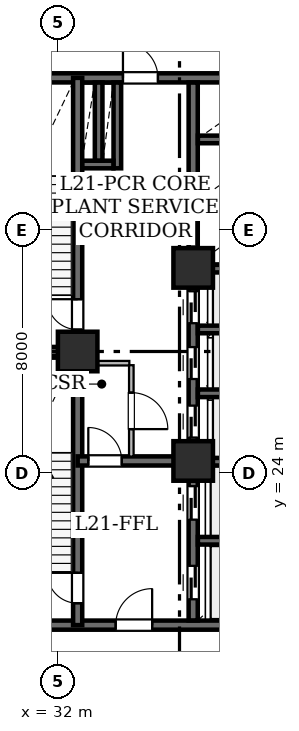
"""IFC4 building model, lengths in metres.
Left out: names, types, materials, properties, quantities, classifications, styles, units other than length and angle.
Written with IfcOpenShell. Run it as: python <this file> out.ifc"""

import sys

from ifc_helpers import new_model, si_unit, direction, frame, frame_2d, origin, origin_2d, place, context, subcontext, project, spatial, rectangle, hollow_rectangle, extrude, element, fill, save


model = new_model("IFC4")
c1 = context("Model", 3, precision=1e-05, world=origin(), true_north=direction((0.0, 1.0)))
c2 = subcontext(c1, "Body", "Model", "MODEL_VIEW")
j1 = project(units=[si_unit("LENGTHUNIT", "METRE"), si_unit("PLANEANGLEUNIT", "RADIAN")], contexts=[c1])
p1 = place(None, origin())
s1 = spatial("IfcSite", under=j1, at=p1, CompositionType="ELEMENT")
p2 = place(p1, origin())
s2 = spatial("IfcBuilding", under=s1, at=p2, CompositionType="ELEMENT")
p3 = place(p2, frame((0.0, 0.0, 84.4)))
s3 = spatial("IfcBuildingStorey", under=s2, at=p3, CompositionType="ELEMENT", Elevation=84.4)
for number, where, z_axis, x_axis in (
    (1, (32.65, 28.0, 0.0), (0.0, 0.0, 1.0), (1.0, 0.0, 0.0)),
    (2, (36.45, 24.4, 0.0), (0.0, 0.0, 1.0), (1.0, 0.0, 0.0)),
    (3, (36.45, 30.75, 0.0), (0.0, 0.0, 1.0), (1.0, 0.0, 0.0)),
):
    element("IfcColumn", number, at=place(p3, frame(where, z_axis=z_axis, x_axis=x_axis)), inside=s3, PredefinedType="COLUMN", context=c2, shape_type="SweptSolid", body=[
        extrude(hollow_rectangle(XDim=1.3, YDim=1.3, WallThickness=0.065, at=origin_2d()), origin(), (0.0, 0.0, 1.0), 5.375),
    ])
p4 = place(p3, frame((29.0, 19.0, 0.0), z_axis=(0.0, 0.0, 1.0), x_axis=(1.0, 0.0, 0.0)))
e4 = element("IfcWall", 4, at=p4, inside=s3, PredefinedType="SHEAR", context=c2, shape_type="SweptSolid", body=[
    extrude(rectangle(XDim=10.4, YDim=0.3, at=frame_2d((5.2, 0.0))), origin(), (0.0, 0.0, 1.0), 4.98),
])
p5 = place(p4, frame((4.9, 0.0, 0.0)))
e5 = element("IfcOpeningElement", 5, at=p5, cuts=e4, PredefinedType="OPENING", context=c2, shape_type="SweptSolid", body=[
    extrude(rectangle(XDim=1.2, YDim=2.15, at=frame_2d((0.6, 1.075))), frame((0.0, 0.16, 0.0), z_axis=(0.0, -1.0, 0.0), x_axis=(1.0, 0.0, 0.0)), (0.0, 0.0, 1.0), 0.32),
])
p6 = place(p3, frame((29.0, 37.0, 0.0), z_axis=(0.0, 0.0, 1.0), x_axis=(1.0, 0.0, 0.0)))
e6 = element("IfcWall", 6, at=p6, inside=s3, PredefinedType="SHEAR", context=c2, shape_type="SweptSolid", body=[
    extrude(rectangle(XDim=10.4, YDim=0.3, at=frame_2d((5.2, 0.0))), origin(), (0.0, 0.0, 1.0), 4.98),
])
p7 = place(p6, frame((5.14, 0.0, 0.0)))
e7 = element("IfcOpeningElement", 7, at=p7, cuts=e6, PredefinedType="OPENING", context=c2, shape_type="SweptSolid", body=[
    extrude(rectangle(XDim=1.15, YDim=2.2, at=frame_2d((0.575, 1.1))), frame((0.0, 0.16, 0.0), z_axis=(0.0, -1.0, 0.0), x_axis=(1.0, 0.0, 0.0)), (0.0, 0.0, 1.0), 0.32),
])
p8 = place(p3, frame((32.65, 19.0, 0.0), z_axis=(0.0, 0.0, 1.0), x_axis=(0.0, 1.0, 0.0)))
e8 = element("IfcWall", 8, at=p8, inside=s3, PredefinedType="SHEAR", context=c2, shape_type="SweptSolid", body=[
    extrude(rectangle(XDim=9.0, YDim=0.3, at=frame_2d((4.5, 0.0))), origin(), (0.0, 0.0, 1.0), 4.98),
])
p9 = place(p8, frame((0.72, 0.0, 0.0)))
e9 = element("IfcOpeningElement", 9, at=p9, cuts=e8, PredefinedType="OPENING", context=c2, shape_type="SweptSolid", body=[
    extrude(rectangle(XDim=1.0, YDim=2.15, at=frame_2d((0.5, 1.075))), frame((0.0, 0.16, 0.0), z_axis=(0.0, -1.0, 0.0), x_axis=(1.0, 0.0, 0.0)), (0.0, 0.0, 1.0), 0.32),
])
p10 = place(p3, frame((32.65, 28.0, 0.0), z_axis=(0.0, 0.0, 1.0), x_axis=(0.0, 1.0, 0.0)))
e10 = element("IfcWall", 10, at=p10, inside=s3, PredefinedType="SHEAR", context=c2, shape_type="SweptSolid", body=[
    extrude(rectangle(XDim=9.0, YDim=0.3, at=frame_2d((4.5, 0.0))), origin(), (0.0, 0.0, 1.0), 4.98),
])
p11 = place(p10, frame((0.72, 0.0, 0.0)))
e11 = element("IfcOpeningElement", 11, at=p11, cuts=e10, PredefinedType="OPENING", context=c2, shape_type="SweptSolid", body=[
    extrude(rectangle(XDim=1.0, YDim=2.15, at=frame_2d((0.5, 1.075))), frame((0.0, 0.16, 0.0), z_axis=(0.0, -1.0, 0.0), x_axis=(1.0, 0.0, 0.0)), (0.0, 0.0, 1.0), 0.32),
])
p12 = place(p3, frame((29.0, 28.0, 0.0), z_axis=(0.0, 0.0, 1.0), x_axis=(1.0, 0.0, 0.0)))
e12 = element("IfcWall", 12, at=p12, inside=s3, PredefinedType="SHEAR", context=c2, shape_type="SweptSolid", body=[
    extrude(rectangle(XDim=3.65, YDim=0.3, at=frame_2d((1.825, 0.0))), origin(), (0.0, 0.0, 1.0), 4.98),
])
p13 = place(p3, frame((32.65, 24.4, 0.0), z_axis=(0.0, 0.0, 1.0), x_axis=(1.0, 0.0, 0.0)))
e13 = element("IfcWall", 13, at=p13, inside=s3, PredefinedType="SHEAR", context=c2, shape_type="SweptSolid", body=[
    extrude(rectangle(XDim=3.8, YDim=0.3, at=frame_2d((1.9, 0.0))), origin(), (0.0, 0.0, 1.0), 4.98),
])
p14 = place(p13, frame((0.35, 0.0, 0.0)))
e14 = element("IfcOpeningElement", 14, at=p14, cuts=e13, PredefinedType="OPENING", context=c2, shape_type="SweptSolid", body=[
    extrude(rectangle(XDim=1.1, YDim=2.15, at=frame_2d((0.55, 1.075))), frame((0.0, 0.16, 0.0), z_axis=(0.0, -1.0, 0.0), x_axis=(1.0, 0.0, 0.0)), (0.0, 0.0, 1.0), 0.32),
])
p15 = place(p3, frame((36.45, 19.154, 0.0), z_axis=(0.0, 0.0, 1.0), x_axis=(0.0, 1.0, 0.0)))
e15 = element("IfcWall", 15, at=p15, inside=s3, PredefinedType="SHEAR", context=c2, shape_type="SweptSolid", body=[
    extrude(rectangle(XDim=4.596, YDim=0.3, at=frame_2d((2.298, 0.0))), origin(), (0.0, 0.0, 1.0), 4.98),
])
p16 = place(p15, frame((0.696, 0.0, 0.0)))
e16 = element("IfcOpeningElement", 16, at=p16, cuts=e15, PredefinedType="OPENING", context=c2, shape_type="SweptSolid", body=[
    extrude(rectangle(XDim=1.1, YDim=2.15, at=frame_2d((0.55, 1.075))), frame((0.0, 0.16, 0.0), z_axis=(0.0, -1.0, 0.0), x_axis=(1.0, 0.0, 0.0)), (0.0, 0.0, 1.0), 0.32),
])
p17 = place(p15, frame((3.316, 0.0, 0.0)))
e17 = element("IfcOpeningElement", 17, at=p17, cuts=e15, PredefinedType="OPENING", context=c2, shape_type="SweptSolid", body=[
    extrude(rectangle(XDim=1.1, YDim=2.15, at=frame_2d((0.55, 1.075))), frame((0.0, 0.16, 0.0), z_axis=(0.0, -1.0, 0.0), x_axis=(1.0, 0.0, 0.0)), (0.0, 0.0, 1.0), 0.32),
])
p18 = place(p3, frame((36.45, 25.05, 0.0), z_axis=(0.0, 0.0, 1.0), x_axis=(0.0, 1.0, 0.0)))
e18 = element("IfcWall", 18, at=p18, inside=s3, PredefinedType="SHEAR", context=c2, shape_type="SweptSolid", body=[
    extrude(rectangle(XDim=5.05, YDim=0.3, at=frame_2d((2.525, 0.0))), origin(), (0.0, 0.0, 1.0), 4.98),
])
p19 = place(p18, frame((0.12, 0.0, 0.0)))
e19 = element("IfcOpeningElement", 19, at=p19, cuts=e18, PredefinedType="OPENING", context=c2, shape_type="SweptSolid", body=[
    extrude(rectangle(XDim=1.05, YDim=2.15, at=frame_2d((0.525, 1.075))), frame((0.0, 0.16, 0.0), z_axis=(0.0, -1.0, 0.0), x_axis=(1.0, 0.0, 0.0)), (0.0, 0.0, 1.0), 0.32),
])
p20 = place(p18, frame((2.045, 0.0, 0.0)))
e20 = element("IfcOpeningElement", 20, at=p20, cuts=e18, PredefinedType="OPENING", context=c2, shape_type="SweptSolid", body=[
    extrude(rectangle(XDim=1.05, YDim=2.15, at=frame_2d((0.525, 1.075))), frame((0.0, 0.16, 0.0), z_axis=(0.0, -1.0, 0.0), x_axis=(1.0, 0.0, 0.0)), (0.0, 0.0, 1.0), 0.32),
])
p21 = place(p18, frame((3.88, 0.0, 0.0)))
e21 = element("IfcOpeningElement", 21, at=p21, cuts=e18, PredefinedType="OPENING", context=c2, shape_type="SweptSolid", body=[
    extrude(rectangle(XDim=1.05, YDim=2.15, at=frame_2d((0.525, 1.075))), frame((0.0, 0.16, 0.0), z_axis=(0.0, -1.0, 0.0), x_axis=(1.0, 0.0, 0.0)), (0.0, 0.0, 1.0), 0.32),
])
p22 = place(p3, frame((36.45, 31.4, 0.0), z_axis=(0.0, 0.0, 1.0), x_axis=(0.0, 1.0, 0.0)))
e22 = element("IfcWall", 22, at=p22, inside=s3, PredefinedType="SHEAR", context=c2, shape_type="SweptSolid", body=[
    extrude(rectangle(XDim=5.446, YDim=0.3, at=frame_2d((2.723, 0.0))), origin(), (0.0, 0.0, 1.0), 4.98),
])
for number, where, z_axis, x_axis in (
    (23, (36.604, 21.775, 0.0), (0.0, 0.0, 1.0), (1.0, 0.0, 0.0)),
    (24, (36.604, 24.375, 0.0), (0.0, 0.0, 1.0), (1.0, 0.0, 0.0)),
    (25, (36.604, 26.625, 0.0), (0.0, 0.0, 1.0), (1.0, 0.0, 0.0)),
    (26, (36.604, 28.725, 0.0), (0.0, 0.0, 1.0), (1.0, 0.0, 0.0)),
    (27, (36.604, 30.725, 0.0), (0.0, 0.0, 1.0), (1.0, 0.0, 0.0)),
    (28, (36.604, 32.925, 0.0), (0.0, 0.0, 1.0), (1.0, 0.0, 0.0)),
    (29, (36.604, 34.975, 0.0), (0.0, 0.0, 1.0), (1.0, 0.0, 0.0)),
):
    element("IfcWall", number, at=place(p3, frame(where, z_axis=z_axis, x_axis=x_axis)), inside=s3, PredefinedType="SHEAR", context=c2, shape_type="SweptSolid", body=[
        extrude(rectangle(XDim=2.642, YDim=0.25, at=frame_2d((1.321, 0.0))), origin(), (0.0, 0.0, 1.0), 4.98),
    ])
p23 = place(p3, frame((33.955, 34.025, 0.0), z_axis=(0.0, 0.0, 1.0), x_axis=(0.0, 1.0, 0.0)))
e30 = element("IfcWall", 30, at=p23, inside=s3, PredefinedType="SHEAR", context=c2, shape_type="SweptSolid", body=[
    extrude(rectangle(XDim=2.821, YDim=0.25, at=frame_2d((1.411, 0.0))), origin(), (0.0, 0.0, 1.0), 4.98),
])
p24 = place(p3, frame((32.804, 34.15, 0.0), z_axis=(0.0, 0.0, 1.0), x_axis=(1.0, 0.0, 0.0)))
e31 = element("IfcWall", 31, at=p24, inside=s3, PredefinedType="SHEAR", context=c2, shape_type="SweptSolid", body=[
    extrude(rectangle(XDim=1.022, YDim=0.25, at=frame_2d((0.511, 0.0))), origin(), (0.0, 0.0, 1.0), 4.98),
])
p25 = place(p3, frame((33.34, 34.279, 0.0), z_axis=(0.0, 0.0, 1.0), x_axis=(0.0, 1.0, 0.0)))
e32 = element("IfcWall", 32, at=p25, inside=s3, PredefinedType="SHEAR", context=c2, shape_type="SweptSolid", body=[
    extrude(rectangle(XDim=2.567, YDim=0.25, at=frame_2d((1.283, 0.0))), origin(), (0.0, 0.0, 1.0), 4.98),
])
p26 = place(p3, frame((32.794, 27.615, 0.0), z_axis=(0.0, 0.0, 1.0), x_axis=(1.0, 0.0, 0.0)))
e33 = element("IfcWall", 33, at=p26, inside=s3, PredefinedType="STANDARD", context=c2, shape_type="SweptSolid", body=[
    extrude(rectangle(XDim=1.556, YDim=0.15, at=frame_2d((0.778, 0.0))), origin(), (0.0, 0.0, 1.0), 4.437),
])
p27 = place(p3, frame((34.415, 27.55, 0.0), z_axis=(0.0, 0.0, 1.0), x_axis=(0.0, -1.0, 0.0)))
e34 = element("IfcWall", 34, at=p27, inside=s3, PredefinedType="STANDARD", context=c2, shape_type="SweptSolid", body=[
    extrude(rectangle(XDim=3.006, YDim=0.15, at=frame_2d((1.503, 0.0))), origin(), (0.0, 0.0, 1.0), 4.98),
])
p28 = place(p27, frame((0.903, 0.0, 0.0)))
e35 = element("IfcOpeningElement", 35, at=p28, cuts=e34, PredefinedType="OPENING", context=c2, shape_type="SweptSolid", body=[
    extrude(rectangle(XDim=1.2, YDim=2.15, at=frame_2d((0.6, 1.075))), frame((0.0, 0.085, 0.0), z_axis=(0.0, -1.0, 0.0), x_axis=(1.0, 0.0, 0.0)), (0.0, 0.0, 1.0), 0.17),
])
p29 = place(p9, origin())
e36 = element("IfcDoor", 36, at=p29, inside=s3, OperationType="SINGLE_SWING_RIGHT", PredefinedType="DOOR", context=c2, shape_type="SweptSolid", body=[
    extrude(rectangle(XDim=1.0, YDim=2.15, at=frame_2d((0.5, 1.075))), frame((0.0, 0.025, 0.0), z_axis=(0.0, -1.0, 0.0), x_axis=(1.0, 0.0, 0.0)), (0.0, 0.0, 1.0), 0.05),
])
fill(e9, e36)
p30 = place(p11, origin())
e37 = element("IfcDoor", 37, at=p30, inside=s3, OperationType="SINGLE_SWING_RIGHT", PredefinedType="DOOR", context=c2, shape_type="SweptSolid", body=[
    extrude(rectangle(XDim=1.0, YDim=2.15, at=frame_2d((0.5, 1.075))), frame((0.0, 0.025, 0.0), z_axis=(0.0, -1.0, 0.0), x_axis=(1.0, 0.0, 0.0)), (0.0, 0.0, 1.0), 0.05),
])
fill(e11, e37)
p31 = place(p14, origin())
e38 = element("IfcDoor", 38, at=p31, inside=s3, OperationType="SINGLE_SWING_LEFT", PredefinedType="DOOR", context=c2, shape_type="SweptSolid", body=[
    extrude(rectangle(XDim=1.1, YDim=2.15, at=frame_2d((0.55, 1.075))), frame((0.0, 0.025, 0.0), z_axis=(0.0, -1.0, 0.0), x_axis=(1.0, 0.0, 0.0)), (0.0, 0.0, 1.0), 0.05),
])
fill(e14, e38)
p32 = place(p5, origin())
e39 = element("IfcDoor", 39, at=p32, inside=s3, OperationType="SINGLE_SWING_RIGHT", PredefinedType="DOOR", context=c2, shape_type="SweptSolid", body=[
    extrude(rectangle(XDim=1.2, YDim=2.15, at=frame_2d((0.6, 1.075))), frame((0.0, 0.025, 0.0), z_axis=(0.0, -1.0, 0.0), x_axis=(1.0, 0.0, 0.0)), (0.0, 0.0, 1.0), 0.05),
])
fill(e5, e39)
p33 = place(p7, origin())
e40 = element("IfcDoor", 40, at=p33, inside=s3, OperationType="SINGLE_SWING_LEFT", PredefinedType="DOOR", context=c2, shape_type="SweptSolid", body=[
    extrude(rectangle(XDim=1.15, YDim=2.2, at=frame_2d((0.575, 1.1))), frame((0.0, 0.025, 0.0), z_axis=(0.0, -1.0, 0.0), x_axis=(1.0, 0.0, 0.0)), (0.0, 0.0, 1.0), 0.05),
])
fill(e7, e40)
p34 = place(p16, origin())
e41 = element("IfcDoor", 41, at=p34, inside=s3, OperationType="SLIDING_TO_LEFT", PredefinedType="DOOR", context=c2, shape_type="SweptSolid", body=[
    extrude(rectangle(XDim=1.1, YDim=2.15, at=frame_2d((0.55, 1.075))), frame((0.0, 0.025, 0.0), z_axis=(0.0, -1.0, 0.0), x_axis=(1.0, 0.0, 0.0)), (0.0, 0.0, 1.0), 0.05),
])
fill(e16, e41)
p35 = place(p17, origin())
e42 = element("IfcDoor", 42, at=p35, inside=s3, OperationType="SLIDING_TO_LEFT", PredefinedType="DOOR", context=c2, shape_type="SweptSolid", body=[
    extrude(rectangle(XDim=1.1, YDim=2.15, at=frame_2d((0.55, 1.075))), frame((0.0, 0.025, 0.0), z_axis=(0.0, -1.0, 0.0), x_axis=(1.0, 0.0, 0.0)), (0.0, 0.0, 1.0), 0.05),
])
fill(e17, e42)
p36 = place(p19, origin())
e43 = element("IfcDoor", 43, at=p36, inside=s3, OperationType="SLIDING_TO_LEFT", PredefinedType="DOOR", context=c2, shape_type="SweptSolid", body=[
    extrude(rectangle(XDim=1.05, YDim=2.15, at=frame_2d((0.525, 1.075))), frame((0.0, 0.025, 0.0), z_axis=(0.0, -1.0, 0.0), x_axis=(1.0, 0.0, 0.0)), (0.0, 0.0, 1.0), 0.05),
])
fill(e19, e43)
p37 = place(p20, origin())
e44 = element("IfcDoor", 44, at=p37, inside=s3, OperationType="SLIDING_TO_LEFT", PredefinedType="DOOR", context=c2, shape_type="SweptSolid", body=[
    extrude(rectangle(XDim=1.05, YDim=2.15, at=frame_2d((0.525, 1.075))), frame((0.0, 0.025, 0.0), z_axis=(0.0, -1.0, 0.0), x_axis=(1.0, 0.0, 0.0)), (0.0, 0.0, 1.0), 0.05),
])
fill(e20, e44)
p38 = place(p21, origin())
e45 = element("IfcDoor", 45, at=p38, inside=s3, OperationType="SLIDING_TO_LEFT", PredefinedType="DOOR", context=c2, shape_type="SweptSolid", body=[
    extrude(rectangle(XDim=1.05, YDim=2.15, at=frame_2d((0.525, 1.075))), frame((0.0, 0.025, 0.0), z_axis=(0.0, -1.0, 0.0), x_axis=(1.0, 0.0, 0.0)), (0.0, 0.0, 1.0), 0.05),
])
fill(e21, e45)
p39 = place(p28, origin())
e46 = element("IfcDoor", 46, at=p39, inside=s3, OperationType="SINGLE_SWING_RIGHT", PredefinedType="DOOR", context=c2, shape_type="SweptSolid", body=[
    extrude(rectangle(XDim=1.2, YDim=2.15, at=frame_2d((0.6, 1.075))), frame((0.0, 0.025, 0.0), z_axis=(0.0, -1.0, 0.0), x_axis=(1.0, 0.0, 0.0)), (0.0, 0.0, 1.0), 0.05),
])
fill(e35, e46)
save(model, sys.argv[1])
